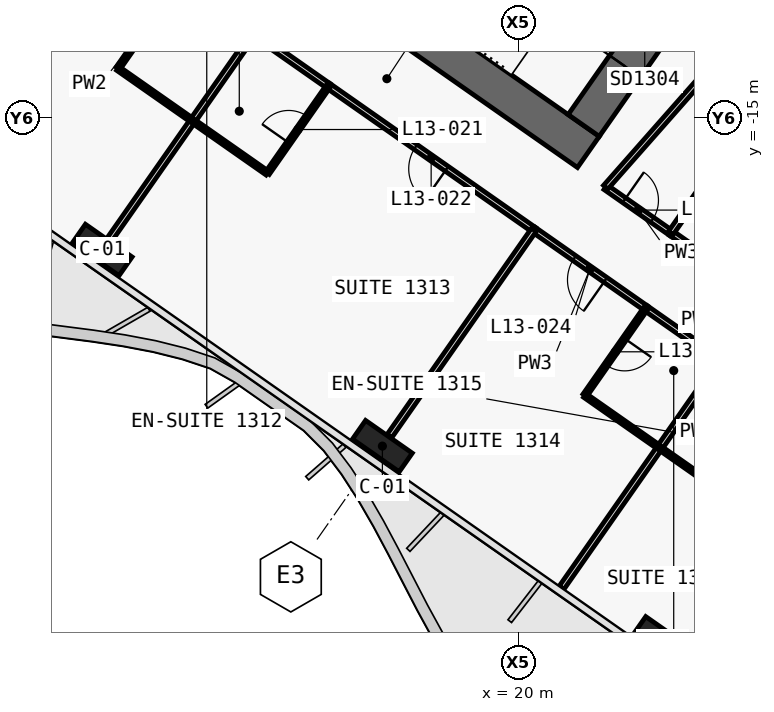
"""IFC4 building model, lengths in metres.
Left out: names, types, materials, properties, quantities, classifications, styles, units other than length and angle.
Written with IfcOpenShell. Run it as: python <this file> out.ifc"""

import sys

from ifc_helpers import new_model, si_unit, direction, frame, frame_2d, origin, origin_2d, place, context, subcontext, project, spatial, polyline, rectangle, outline, extrude, element, fill, save


model = new_model("IFC4")
c1 = context("Model", 3, precision=1e-05, world=origin(), true_north=direction((0.0, 1.0)))
c2 = subcontext(c1, "Body", "Model", "MODEL_VIEW")
j1 = project(units=[si_unit("LENGTHUNIT", "METRE"), si_unit("PLANEANGLEUNIT", "RADIAN")], contexts=[c1])
p1 = place(None, origin())
s1 = spatial("IfcSite", under=j1, at=p1, CompositionType="ELEMENT")
p2 = place(p1, origin())
s2 = spatial("IfcBuilding", under=s1, at=p2, CompositionType="ELEMENT")
p3 = place(p2, frame((0.0, 0.0, 72.5)))
s3 = spatial("IfcBuildingStorey", under=s2, at=p3, CompositionType="ELEMENT", Elevation=72.5)
p4 = place(p3, frame((-0.037, -0.585, 0.0), z_axis=(0.0, 0.0, 1.0), x_axis=(0.819157152511, -0.573569140985, 0.0)))
e1 = element("IfcWall", 1, at=p4, inside=s3, PredefinedType="SHEAR", context=c2, shape_type="SweptSolid", body=[
    extrude(outline(polyline([(26.695, 0.5), (0.0, 0.5), (0.7, -0.5), (26.695, -0.5), (26.695, 0.5)])), origin(), (0.0, 0.0, 1.0), 3.6),
])
p5 = place(p4, frame((1.045, 0.0, 0.0)))
e2 = element("IfcOpeningElement", 2, at=p5, cuts=e1, PredefinedType="OPENING", context=c2, shape_type="SweptSolid", body=[
    extrude(rectangle(XDim=1.5, YDim=2.1, at=frame_2d((0.75, 1.05))), frame((0.0, 0.51, 0.0), z_axis=(0.0, -1.0, 0.0), x_axis=(1.0, 0.0, 0.0)), (0.0, 0.0, 1.0), 1.02),
])
p6 = place(p4, frame((12.445, 0.0, 0.0)))
e3 = element("IfcOpeningElement", 3, at=p6, cuts=e1, PredefinedType="OPENING", context=c2, shape_type="SweptSolid", body=[
    extrude(rectangle(XDim=1.5, YDim=2.1, at=frame_2d((0.75, 1.05))), frame((0.0, 0.51, 0.0), z_axis=(0.0, -1.0, 0.0), x_axis=(1.0, 0.0, 0.0)), (0.0, 0.0, 1.0), 1.02),
])
p7 = place(p3, frame((21.708, -15.2, 0.0), z_axis=(0.0, 0.0, 1.0), x_axis=(0.573576324356, 0.819152122709, 0.0)))
e4 = element("IfcWall", 4, at=p7, inside=s3, PredefinedType="SHEAR", context=c2, shape_type="SweptSolid", body=[
    extrude(outline(polyline([(9.2, 0.5), (0.0, 0.5), (0.0, -0.5), (9.2, -0.5), (9.2, 0.5)])), origin(), (0.0, 0.0, 1.0), 3.6),
])
p8 = place(p7, frame((6.1, 0.0, 0.0)))
e5 = element("IfcOpeningElement", 5, at=p8, cuts=e4, PredefinedType="OPENING", context=c2, shape_type="SweptSolid", body=[
    extrude(rectangle(XDim=1.8, YDim=2.1, at=frame_2d((0.9, 1.05))), frame((0.0, 0.51, 0.0), z_axis=(0.0, -1.0, 0.0), x_axis=(1.0, 0.0, 0.0)), (0.0, 0.0, 1.0), 1.02),
])
p9 = place(p7, frame((1.9, 0.0, 0.0)))
e6 = element("IfcOpeningElement", 6, at=p9, cuts=e4, PredefinedType="OPENING", context=c2, shape_type="SweptSolid", body=[
    extrude(rectangle(XDim=1.8, YDim=2.1, at=frame_2d((0.9, 1.05))), frame((0.0, 0.51, 0.0), z_axis=(0.0, -1.0, 0.0), x_axis=(1.0, 0.0, 0.0)), (0.0, 0.0, 1.0), 1.02),
])
for number, where, z_axis, x_axis in (
    (7, (9.038, -18.475, 0.0), (0.0, 0.0, 1.0), (0.819, -0.574, 0.0)),
    (8, (16.41, -23.637, 0.0), (0.0, 0.0, 1.0), (0.819, -0.574, 0.0)),
    (9, (23.782, -28.799, 0.0), (0.0, 0.0, 1.0), (0.819, -0.574, 0.0)),
):
    element("IfcColumn", number, at=place(p3, frame(where, z_axis=z_axis, x_axis=x_axis)), inside=s3, PredefinedType="COLUMN", context=c2, shape_type="SweptSolid", body=[
        extrude(rectangle(XDim=1.5, YDim=0.6, at=origin_2d()), origin(), (0.0, 0.0, 1.0), 3.6),
    ])
p10 = place(p3, frame((22.284, -16.824, 0.0), z_axis=(0.0, 0.0, 1.0), x_axis=(0.819160859995, -0.573563846013, 0.0)))
e10 = element("IfcWall", 10, at=p10, inside=s3, PredefinedType="PARTITIONING", context=c2, shape_type="SweptSolid", body=[
    extrude(rectangle(XDim=2.098, YDim=0.15, at=frame_2d((1.049, 0.0))), origin(), (0.0, 0.0, 1.0), 3.32),
])
p11 = place(p10, frame((0.599, 0.0, 0.0)))
e11 = element("IfcOpeningElement", 11, at=p11, cuts=e10, PredefinedType="OPENING", context=c2, shape_type="SweptSolid", body=[
    extrude(rectangle(XDim=0.9, YDim=2.1, at=frame_2d((0.45, 1.05))), frame((0.0, 0.085, 0.0), z_axis=(0.0, -1.0, 0.0), x_axis=(1.0, 0.0, 0.0)), (0.0, 0.0, 1.0), 0.17),
])
p12 = place(p3, frame((23.999, -18.025, 0.0), z_axis=(0.0, 0.0, 1.0), x_axis=(0.819146032251, -0.573585022335, 0.0)))
e12 = element("IfcWall", 12, at=p12, inside=s3, PredefinedType="PARTITIONING", context=c2, shape_type="SweptSolid", body=[
    extrude(rectangle(XDim=2.404, YDim=0.15, at=frame_2d((1.202, 0.0))), origin(), (0.0, 0.0, 1.0), 3.32),
])
p13 = place(p3, frame((20.398, -17.945, 0.0), z_axis=(0.0, 0.0, 1.0), x_axis=(-0.819124209701, 0.57361618621, 0.0)))
e13 = element("IfcWall", 13, at=p13, inside=s3, PredefinedType="PARTITIONING", context=c2, shape_type="SweptSolid", body=[
    extrude(rectangle(XDim=6.603, YDim=0.15, at=frame_2d((3.302, 0.0))), origin(), (0.0, 0.0, 1.0), 2.6),
])
p14 = place(p13, frame((2.802, 0.0, 0.0)))
e14 = element("IfcOpeningElement", 14, at=p14, cuts=e13, PredefinedType="OPENING", context=c2, shape_type="SweptSolid", body=[
    extrude(rectangle(XDim=1.0, YDim=2.1, at=frame_2d((0.5, 1.05))), frame((0.0, 0.085, 0.0), z_axis=(0.0, -1.0, 0.0), x_axis=(1.0, 0.0, 0.0)), (0.0, 0.0, 1.0), 0.17),
])
p15 = place(p3, frame((14.992, -14.16, 0.0), z_axis=(0.0, 0.0, 1.0), x_axis=(-0.819146032251, 0.573585022335, 0.0)))
e15 = element("IfcWall", 15, at=p15, inside=s3, PredefinedType="PARTITIONING", context=c2, shape_type="SweptSolid", body=[
    extrude(rectangle(XDim=2.404, YDim=0.15, at=frame_2d((1.202, 0.0))), origin(), (0.0, 0.0, 1.0), 2.6),
])
p16 = place(p3, frame((23.346, -20.01, 0.0), z_axis=(0.0, 0.0, 1.0), x_axis=(-0.819145961204, 0.573585123798, 0.0)))
e16 = element("IfcWall", 16, at=p16, inside=s3, PredefinedType="PARTITIONING", context=c2, shape_type="SweptSolid", body=[
    extrude(rectangle(XDim=3.603, YDim=0.15, at=frame_2d((1.802, 0.0))), origin(), (0.0, 0.0, 1.0), 2.6),
])
p17 = place(p16, frame((1.301, 0.0, 0.0)))
e17 = element("IfcOpeningElement", 17, at=p17, cuts=e16, PredefinedType="OPENING", context=c2, shape_type="SweptSolid", body=[
    extrude(rectangle(XDim=1.0, YDim=2.1, at=frame_2d((0.5, 1.05))), frame((0.0, 0.085, 0.0), z_axis=(0.0, -1.0, 0.0), x_axis=(1.0, 0.0, 0.0)), (0.0, 0.0, 1.0), 0.17),
])
p18 = place(p3, frame((25.313, -21.387, 0.0), z_axis=(0.0, 0.0, 1.0), x_axis=(-0.819146032251, 0.573585022335, 0.0)))
e18 = element("IfcWall", 18, at=p18, inside=s3, PredefinedType="PARTITIONING", context=c2, shape_type="SweptSolid", body=[
    extrude(rectangle(XDim=2.404, YDim=0.15, at=frame_2d((1.202, 0.0))), origin(), (0.0, 0.0, 1.0), 3.32),
])
p19 = place(p3, frame((25.608, -15.731, 0.0), z_axis=(0.0, 0.0, 1.0), x_axis=(-0.573596837309, -0.819137759006, 0.0)))
e19 = element("IfcWall", 19, at=p19, inside=s3, PredefinedType="PARTITIONING", context=c2, shape_type="SweptSolid", body=[
    extrude(rectangle(XDim=2.802, YDim=0.15, at=frame_2d((1.401, 0.0))), origin(), (0.0, 0.0, 1.0), 2.6),
])
p20 = place(p3, frame((22.285, -16.825, 0.0), z_axis=(0.0, 0.0, 1.0), x_axis=(0.661551268245, 0.749899939647, 0.0)))
e20 = element("IfcWall", 20, at=p20, inside=s3, PredefinedType="PARTITIONING", context=c2, shape_type="SweptSolid", body=[
    extrude(rectangle(XDim=6.541, YDim=0.15, at=frame_2d((3.271, 0.0))), origin(), (0.0, 0.0, 1.0), 2.6),
])
p21 = place(p3, frame((11.057, -11.405, 0.0), z_axis=(0.0, 0.0, 1.0), x_axis=(-0.573591086599, -0.819141785879, 0.0)))
e21 = element("IfcWall", 21, at=p21, inside=s3, PredefinedType="PARTITIONING", context=c2, shape_type="SweptSolid", body=[
    extrude(rectangle(XDim=2.8, YDim=0.12, at=frame_2d((1.4, 0.0))), origin(), (0.0, 0.0, 1.0), 3.32),
])
p22 = place(p21, frame((0.975, 0.0, 0.0)))
e22 = element("IfcOpeningElement", 22, at=p22, cuts=e21, PredefinedType="OPENING", context=c2, shape_type="SweptSolid", body=[
    extrude(rectangle(XDim=0.85, YDim=2.05, at=frame_2d((0.425, 1.025))), frame((0.0, 0.07, 0.0), z_axis=(0.0, -1.0, 0.0), x_axis=(1.0, 0.0, 0.0)), (0.0, 0.0, 1.0), 0.14),
])
p23 = place(p3, frame((9.451, -13.7, 0.0), z_axis=(0.0, 0.0, 1.0), x_axis=(0.819141114317, -0.573592045652, 0.0)))
e23 = element("IfcWall", 23, at=p23, inside=s3, PredefinedType="PARTITIONING", context=c2, shape_type="SweptSolid", body=[
    extrude(rectangle(XDim=2.4, YDim=0.12, at=frame_2d((1.2, 0.0))), origin(), (0.0, 0.0, 1.0), 2.6),
])
p24 = place(p3, frame((11.417, -15.076, 0.0), z_axis=(0.0, 0.0, 1.0), x_axis=(-0.573594994199, -0.819139049631, 0.0)))
e24 = element("IfcWall", 24, at=p24, inside=s3, PredefinedType="PARTITIONING", context=c2, shape_type="SweptSolid", body=[
    extrude(rectangle(XDim=3.829, YDim=0.15, at=frame_2d((1.915, 0.0))), origin(), (0.0, 0.0, 1.0), 2.6),
])
p25 = place(p3, frame((13.024, -12.782, 0.0), z_axis=(0.0, 0.0, 1.0), x_axis=(-0.573550118428, -0.819170471667, 0.0)))
e25 = element("IfcWall", 25, at=p25, inside=s3, PredefinedType="PARTITIONING", context=c2, shape_type="SweptSolid", body=[
    extrude(rectangle(XDim=2.8, YDim=0.15, at=frame_2d((1.4, 0.0))), origin(), (0.0, 0.0, 1.0), 2.6),
])
p26 = place(p3, frame((11.417, -15.076, 0.0), z_axis=(0.0, 0.0, 1.0), x_axis=(0.819155442668, -0.573571582932, 0.0)))
e26 = element("IfcWall", 26, at=p26, inside=s3, PredefinedType="PARTITIONING", context=c2, shape_type="SweptSolid", body=[
    extrude(rectangle(XDim=2.4, YDim=0.12, at=frame_2d((1.2, 0.0))), origin(), (0.0, 0.0, 1.0), 2.6),
])
p27 = place(p3, frame((13.385, -16.453, 0.0), z_axis=(0.0, 0.0, 1.0), x_axis=(0.573550118428, 0.819170471667, 0.0)))
e27 = element("IfcWall", 27, at=p27, inside=s3, PredefinedType="PARTITIONING", context=c2, shape_type="SweptSolid", body=[
    extrude(rectangle(XDim=2.8, YDim=0.12, at=frame_2d((1.4, 0.0))), origin(), (0.0, 0.0, 1.0), 3.32),
])
p28 = place(p27, frame((0.975, 0.0, 0.0)))
e28 = element("IfcOpeningElement", 28, at=p28, cuts=e27, PredefinedType="OPENING", context=c2, shape_type="SweptSolid", body=[
    extrude(rectangle(XDim=0.85, YDim=2.05, at=frame_2d((0.425, 1.025))), frame((0.0, 0.07, 0.0), z_axis=(0.0, -1.0, 0.0), x_axis=(1.0, 0.0, 0.0)), (0.0, 0.0, 1.0), 0.14),
])
p29 = place(p3, frame((20.396, -17.944, 0.0), z_axis=(0.0, 0.0, 1.0), x_axis=(-0.57359826181, -0.819136761505, 0.0)))
e29 = element("IfcWall", 29, at=p29, inside=s3, PredefinedType="PARTITIONING", context=c2, shape_type="SweptSolid", body=[
    extrude(rectangle(XDim=6.63, YDim=0.15, at=frame_2d((3.315, 0.0))), origin(), (0.0, 0.0, 1.0), 2.6),
])
p30 = place(p3, frame((23.344, -20.008, 0.0), z_axis=(0.0, 0.0, 1.0), x_axis=(-0.573550118428, -0.819170471667, 0.0)))
e30 = element("IfcWall", 30, at=p30, inside=s3, PredefinedType="PARTITIONING", context=c2, shape_type="SweptSolid", body=[
    extrude(rectangle(XDim=2.8, YDim=0.12, at=frame_2d((1.4, 0.0))), origin(), (0.0, 0.0, 1.0), 3.32),
])
p31 = place(p30, frame((0.975, 0.0, 0.0)))
e31 = element("IfcOpeningElement", 31, at=p31, cuts=e30, PredefinedType="OPENING", context=c2, shape_type="SweptSolid", body=[
    extrude(rectangle(XDim=0.85, YDim=2.05, at=frame_2d((0.425, 1.025))), frame((0.0, 0.07, 0.0), z_axis=(0.0, -1.0, 0.0), x_axis=(1.0, 0.0, 0.0)), (0.0, 0.0, 1.0), 0.14),
])
p32 = place(p3, frame((21.739, -22.303, 0.0), z_axis=(0.0, 0.0, 1.0), x_axis=(0.819107643868, -0.573639841501, 0.0)))
e32 = element("IfcWall", 32, at=p32, inside=s3, PredefinedType="PARTITIONING", context=c2, shape_type="SweptSolid", body=[
    extrude(rectangle(XDim=2.4, YDim=0.12, at=frame_2d((1.2, 0.0))), origin(), (0.0, 0.0, 1.0), 3.32),
])
p33 = place(p3, frame((23.705, -23.68, 0.0), z_axis=(0.0, 0.0, 1.0), x_axis=(-0.573553393703, -0.819168178442, 0.0)))
e33 = element("IfcWall", 33, at=p33, inside=s3, PredefinedType="PARTITIONING", context=c2, shape_type="SweptSolid", body=[
    extrude(rectangle(XDim=4.499, YDim=0.15, at=frame_2d((2.25, 0.0))), origin(), (0.0, 0.0, 1.0), 2.5),
])
p34 = place(p3, frame((25.311, -21.385, 0.0), z_axis=(0.0, 0.0, 1.0), x_axis=(-0.573550118428, -0.819170471667, 0.0)))
e34 = element("IfcWall", 34, at=p34, inside=s3, PredefinedType="PARTITIONING", context=c2, shape_type="SweptSolid", body=[
    extrude(rectangle(XDim=2.8, YDim=0.15, at=frame_2d((1.4, 0.0))), origin(), (0.0, 0.0, 1.0), 3.32),
])
p35 = place(p3, frame((23.705, -23.68, 0.0), z_axis=(0.0, 0.0, 1.0), x_axis=(0.819188907105, -0.573523787192, 0.0)))
e35 = element("IfcWall", 35, at=p35, inside=s3, PredefinedType="PARTITIONING", context=c2, shape_type="SweptSolid", body=[
    extrude(rectangle(XDim=2.4, YDim=0.12, at=frame_2d((1.2, 0.0))), origin(), (0.0, 0.0, 1.0), 3.32),
])
p36 = place(p9, origin())
e36 = element("IfcDoor", 36, at=p36, inside=s3, OperationType="DOUBLE_DOOR_SINGLE_SWING", PredefinedType="DOOR", context=c2, shape_type="SweptSolid", body=[
    extrude(rectangle(XDim=1.8, YDim=2.1, at=frame_2d((0.9, 1.05))), frame((0.0, 0.025, 0.0), z_axis=(0.0, -1.0, 0.0), x_axis=(1.0, 0.0, 0.0)), (0.0, 0.0, 1.0), 0.05),
])
fill(e6, e36)
p37 = place(p28, origin())
e37 = element("IfcDoor", 37, at=p37, inside=s3, OperationType="SINGLE_SWING_LEFT", PredefinedType="DOOR", context=c2, shape_type="SweptSolid", body=[
    extrude(rectangle(XDim=0.85, YDim=2.05, at=frame_2d((0.425, 1.025))), frame((0.0, 0.025, 0.0), z_axis=(0.0, -1.0, 0.0), x_axis=(1.0, 0.0, 0.0)), (0.0, 0.0, 1.0), 0.05),
])
fill(e28, e37)
p38 = place(p14, origin())
e38 = element("IfcDoor", 38, at=p38, inside=s3, OperationType="SINGLE_SWING_LEFT", PredefinedType="DOOR", context=c2, shape_type="SweptSolid", body=[
    extrude(rectangle(XDim=1.0, YDim=2.1, at=frame_2d((0.5, 1.05))), frame((0.0, 0.025, 0.0), z_axis=(0.0, -1.0, 0.0), x_axis=(1.0, 0.0, 0.0)), (0.0, 0.0, 1.0), 0.05),
])
fill(e14, e38)
p39 = place(p31, origin())
e39 = element("IfcDoor", 39, at=p39, inside=s3, OperationType="SINGLE_SWING_LEFT", PredefinedType="DOOR", context=c2, shape_type="SweptSolid", body=[
    extrude(rectangle(XDim=0.85, YDim=2.05, at=frame_2d((0.425, 1.025))), frame((0.0, 0.025, 0.0), z_axis=(0.0, -1.0, 0.0), x_axis=(1.0, 0.0, 0.0)), (0.0, 0.0, 1.0), 0.05),
])
fill(e31, e39)
p40 = place(p17, origin())
e40 = element("IfcDoor", 40, at=p40, inside=s3, OperationType="SINGLE_SWING_RIGHT", PredefinedType="DOOR", context=c2, shape_type="SweptSolid", body=[
    extrude(rectangle(XDim=1.0, YDim=2.1, at=frame_2d((0.5, 1.05))), frame((0.0, 0.025, 0.0), z_axis=(0.0, -1.0, 0.0), x_axis=(1.0, 0.0, 0.0)), (0.0, 0.0, 1.0), 0.05),
])
fill(e17, e40)
p41 = place(p11, origin())
e41 = element("IfcDoor", 41, at=p41, inside=s3, OperationType="SINGLE_SWING_RIGHT", PredefinedType="DOOR", context=c2, shape_type="SweptSolid", body=[
    extrude(rectangle(XDim=0.9, YDim=2.1, at=frame_2d((0.45, 1.05))), frame((0.0, 0.025, 0.0), z_axis=(0.0, -1.0, 0.0), x_axis=(1.0, 0.0, 0.0)), (0.0, 0.0, 1.0), 0.05),
])
fill(e11, e41)
save(model, sys.argv[1])
